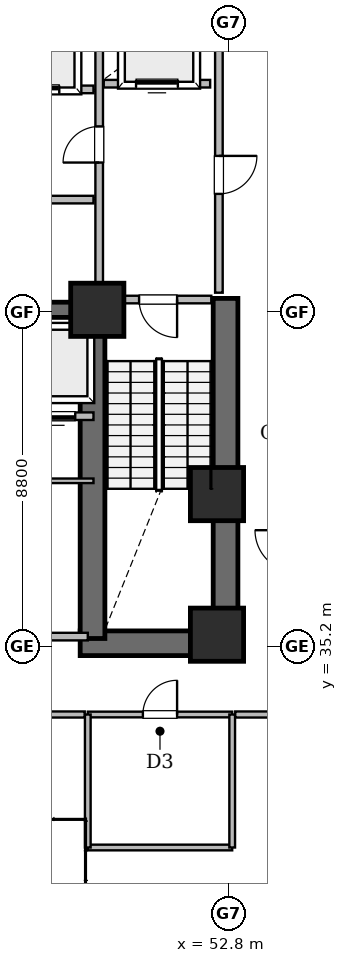
"""IFC4 building model, lengths in metres.
Left out: names, types, materials, properties, quantities, classifications, styles, units other than length and angle.
Written with IfcOpenShell. Run it as: python <this file> out.ifc"""

import sys

from ifc_helpers import new_model, si_unit, direction, frame, frame_2d, origin, origin_2d, place, context, subcontext, project, spatial, rectangle, extrude, element, fill, save


model = new_model("IFC4")
c1 = context("Model", 3, precision=1e-05, world=origin(), true_north=direction((0.0, 1.0)))
c2 = subcontext(c1, "Body", "Model", "MODEL_VIEW")
j1 = project(units=[si_unit("LENGTHUNIT", "METRE"), si_unit("PLANEANGLEUNIT", "RADIAN")], contexts=[c1])
p1 = place(None, origin())
s1 = spatial("IfcSite", under=j1, at=p1, CompositionType="ELEMENT")
p2 = place(p1, origin())
s2 = spatial("IfcBuilding", under=s1, at=p2, CompositionType="ELEMENT")
p3 = place(p2, frame((0.0, 0.0, 4.8)))
s3 = spatial("IfcBuildingStorey", under=s2, at=p3, CompositionType="ELEMENT", Elevation=4.8)
p4 = place(p3, frame((48.9, 35.275, 0.0), z_axis=(0.0, 0.0, 1.0), x_axis=(1.0, 0.0, 0.0)))
e1 = element("IfcWall", 1, at=p4, inside=s3, PredefinedType="SHEAR", context=c2, shape_type="SweptSolid", body=[
    extrude(rectangle(XDim=4.15, YDim=0.65, at=frame_2d((2.075, 0.0))), origin(), (0.0, 0.0, 1.0), 4.5),
])
p5 = place(p3, frame((52.725, 34.95, 0.0), z_axis=(0.0, 0.0, 1.0), x_axis=(0.0, 1.0, 0.0)))
e2 = element("IfcWall", 2, at=p5, inside=s3, PredefinedType="SHEAR", context=c2, shape_type="SweptSolid", body=[
    extrude(rectangle(XDim=9.4, YDim=0.65, at=frame_2d((4.7, 0.0))), origin(), (0.0, 0.0, 1.0), 4.5),
])
p6 = place(p3, frame((49.225, 35.4, 0.0), z_axis=(0.0, 0.0, 1.0), x_axis=(0.0, 1.0, 0.0)))
e3 = element("IfcWall", 3, at=p6, inside=s3, PredefinedType="SHEAR", context=c2, shape_type="SweptSolid", body=[
    extrude(rectangle(XDim=8.95, YDim=0.65, at=frame_2d((4.475, 0.0))), origin(), (0.0, 0.0, 1.0), 4.5),
])
p7 = place(p3, frame((45.05, 44.05, 0.0), z_axis=(0.0, 0.0, 1.0), x_axis=(1.0, 0.0, 0.0)))
e4 = element("IfcWall", 4, at=p7, inside=s3, PredefinedType="SHEAR", context=c2, shape_type="SweptSolid", body=[
    extrude(rectangle(XDim=4.2, YDim=0.4, at=frame_2d((2.1, 0.0))), origin(), (0.0, 0.0, 1.0), 4.5),
])
for number, where, z_axis, x_axis in (
    (5, (52.5, 35.5, 0.0), (0.0, 0.0, 1.0), (1.0, 0.0, 0.0)),
    (6, (52.5, 39.2, 0.0), (0.0, 0.0, 1.0), (1.0, 0.0, 0.0)),
    (7, (49.35, 44.05, 0.0), (0.0, 0.0, 1.0), (1.0, 0.0, 0.0)),
):
    element("IfcColumn", number, at=place(p3, frame(where, z_axis=z_axis, x_axis=x_axis)), inside=s3, PredefinedType="COLUMN", context=c2, shape_type="SweptSolid", body=[
        extrude(rectangle(XDim=1.4, YDim=1.4, at=origin_2d()), origin(), (0.0, 0.0, 1.0), 4.8),
    ])
p8 = place(p3, frame((38.9, 35.45, 0.0), z_axis=(0.0, 0.0, 1.0), x_axis=(1.0, 0.0, 0.0)))
e8 = element("IfcWall", 8, at=p8, inside=s3, PredefinedType="SOLIDWALL", context=c2, shape_type="SweptSolid", body=[
    extrude(rectangle(XDim=10.2, YDim=0.2, at=frame_2d((5.1, 0.0))), origin(), (0.0, 0.0, 1.0), 4.5),
])
p9 = place(p8, frame((4.6, 0.0, 0.0)))
e9 = element("IfcOpeningElement", 9, at=p9, cuts=e8, PredefinedType="OPENING", context=c2, shape_type="SweptSolid", body=[
    extrude(rectangle(XDim=1.0, YDim=2.15, at=frame_2d((0.5, 1.075))), frame((0.0, 0.11, 0.0), z_axis=(0.0, -1.0, 0.0), x_axis=(1.0, 0.0, 0.0)), (0.0, 0.0, 1.0), 0.22),
])
p10 = place(p3, frame((52.55, 44.5, 0.0), z_axis=(0.0, 0.0, 1.0), x_axis=(0.0, 1.0, 0.0)))
e10 = element("IfcWall", 10, at=p10, inside=s3, PredefinedType="SOLIDWALL", context=c2, shape_type="SweptSolid", body=[
    extrude(rectangle(XDim=7.92, YDim=0.2, at=frame_2d((3.96, 0.0))), origin(), (0.0, 0.0, 1.0), 4.5),
])
p11 = place(p10, frame((2.6, 0.0, 0.0)))
e11 = element("IfcOpeningElement", 11, at=p11, cuts=e10, PredefinedType="OPENING", context=c2, shape_type="SweptSolid", body=[
    extrude(rectangle(XDim=1.0, YDim=2.15, at=frame_2d((0.5, 1.075))), frame((0.0, 0.11, 0.0), z_axis=(0.0, -1.0, 0.0), x_axis=(1.0, 0.0, 0.0)), (0.0, 0.0, 1.0), 0.22),
])
p12 = place(p3, frame((49.4, 44.5, 0.0), z_axis=(0.0, 0.0, 1.0), x_axis=(0.0, 1.0, 0.0)))
e12 = element("IfcWall", 12, at=p12, inside=s3, PredefinedType="SOLIDWALL", context=c2, shape_type="SweptSolid", body=[
    extrude(rectangle(XDim=7.92, YDim=0.2, at=frame_2d((3.96, 0.0))), origin(), (0.0, 0.0, 1.0), 3.588),
])
p13 = place(p12, frame((3.425, 0.0, 0.0)))
e13 = element("IfcOpeningElement", 13, at=p13, cuts=e12, PredefinedType="OPENING", context=c2, shape_type="SweptSolid", body=[
    extrude(rectangle(XDim=0.95, YDim=2.15, at=frame_2d((0.475, 1.075))), frame((0.0, 0.11, 0.0), z_axis=(0.0, -1.0, 0.0), x_axis=(1.0, 0.0, 0.0)), (0.0, 0.0, 1.0), 0.22),
])
p14 = place(p3, frame((43.75, 49.85, 0.0), z_axis=(0.0, 0.0, 1.0), x_axis=(1.0, 0.0, 0.0)))
e14 = element("IfcWall", 14, at=p14, inside=s3, PredefinedType="SOLIDWALL", context=c2, shape_type="SweptSolid", body=[
    extrude(rectangle(XDim=5.5, YDim=0.2, at=frame_2d((2.75, 0.0))), origin(), (0.0, 0.0, 1.0), 3.588),
])
p15 = place(p14, frame((3.5, 0.0, 0.0)))
e15 = element("IfcOpeningElement", 15, at=p15, cuts=e14, PredefinedType="OPENING", context=c2, shape_type="SweptSolid", body=[
    extrude(rectangle(XDim=1.1, YDim=2.15, at=frame_2d((0.55, 1.075))), frame((0.0, 0.11, 0.0), z_axis=(0.0, -1.0, 0.0), x_axis=(1.0, 0.0, 0.0)), (0.0, 0.0, 1.0), 0.22),
])
p16 = place(p3, frame((45.32, 41.25, 0.0), z_axis=(0.0, 0.0, 1.0), x_axis=(1.0, 0.0, 0.0)))
e16 = element("IfcWall", 16, at=p16, inside=s3, PredefinedType="SOLIDWALL", context=c2, shape_type="SweptSolid", body=[
    extrude(rectangle(XDim=3.93, YDim=0.2, at=frame_2d((1.965, 0.0))), origin(), (0.0, 0.0, 1.0), 4.5),
])
p17 = place(p16, frame((0.45, 0.0, 0.0)))
e17 = element("IfcOpeningElement", 17, at=p17, cuts=e16, PredefinedType="OPENING", context=c2, shape_type="SweptSolid", body=[
    extrude(rectangle(XDim=1.0, YDim=2.15, at=frame_2d((0.5, 1.075))), frame((0.0, 0.11, 0.0), z_axis=(0.0, -1.0, 0.0), x_axis=(1.0, 0.0, 0.0)), (0.0, 0.0, 1.0), 0.22),
])
p18 = place(p16, frame((2.45, 0.0, 0.0)))
e18 = element("IfcOpeningElement", 18, at=p18, cuts=e16, PredefinedType="OPENING", context=c2, shape_type="SweptSolid", body=[
    extrude(rectangle(XDim=1.0, YDim=2.15, at=frame_2d((0.5, 1.075))), frame((0.0, 0.11, 0.0), z_axis=(0.0, -1.0, 0.0), x_axis=(1.0, 0.0, 0.0)), (0.0, 0.0, 1.0), 0.22),
])
p19 = place(p3, frame((45.32, 39.55, 0.0), z_axis=(0.0, 0.0, 1.0), x_axis=(1.0, 0.0, 0.0)))
e19 = element("IfcWall", 19, at=p19, inside=s3, PredefinedType="PARTITIONING", context=c2, shape_type="SweptSolid", body=[
    extrude(rectangle(XDim=3.93, YDim=0.12, at=frame_2d((1.965, 0.0))), origin(), (0.0, 0.0, 1.0), 4.5),
])
p20 = place(p19, frame((1.49, 0.0, 0.0)))
e20 = element("IfcOpeningElement", 20, at=p20, cuts=e19, PredefinedType="OPENING", context=c2, shape_type="SweptSolid", body=[
    extrude(rectangle(XDim=0.92, YDim=2.1, at=frame_2d((0.46, 1.05))), frame((0.0, 0.07, 0.0), z_axis=(0.0, -1.0, 0.0), x_axis=(1.0, 0.0, 0.0)), (0.0, 0.0, 1.0), 0.14),
])
p21 = place(p3, frame((49.1, 33.4, 0.0), z_axis=(0.0, 0.0, 1.0), x_axis=(1.0, 0.0, 0.0)))
e21 = element("IfcWall", 21, at=p21, inside=s3, PredefinedType="PLUMBINGWALL", context=c2, shape_type="SweptSolid", body=[
    extrude(rectangle(XDim=3.8, YDim=0.15, at=frame_2d((1.9, 0.0))), origin(), (0.0, 0.0, 1.0), 4.0),
])
p22 = place(p21, frame((1.45, 0.0, 0.0)))
e22 = element("IfcOpeningElement", 22, at=p22, cuts=e21, PredefinedType="OPENING", context=c2, shape_type="SweptSolid", body=[
    extrude(rectangle(XDim=0.9, YDim=2.1, at=frame_2d((0.45, 1.05))), frame((0.0, 0.085, 0.0), z_axis=(0.0, -1.0, 0.0), x_axis=(1.0, 0.0, 0.0)), (0.0, 0.0, 1.0), 0.17),
])
p23 = place(p3, frame((49.55, 44.32, 0.0), z_axis=(0.0, 0.0, 1.0), x_axis=(1.0, 0.0, 0.0)))
e23 = element("IfcWall", 23, at=p23, inside=s3, PredefinedType="SOLIDWALL", context=c2, shape_type="SweptSolid", body=[
    extrude(rectangle(XDim=2.8, YDim=0.2, at=frame_2d((1.4, 0.0))), origin(), (0.0, 0.0, 1.0), 3.588),
])
p24 = place(p23, frame((0.9, 0.0, 0.0)))
e24 = element("IfcOpeningElement", 24, at=p24, cuts=e23, PredefinedType="OPENING", context=c2, shape_type="SweptSolid", body=[
    extrude(rectangle(XDim=1.0, YDim=2.15, at=frame_2d((0.5, 1.075))), frame((0.0, 0.11, 0.0), z_axis=(0.0, -1.0, 0.0), x_axis=(1.0, 0.0, 0.0)), (0.0, 0.0, 1.0), 0.22),
])
p25 = place(p3, frame((49.52, 50.0, 0.0), z_axis=(0.0, 0.0, 1.0), x_axis=(1.0, 0.0, 0.0)))
e25 = element("IfcWall", 25, at=p25, inside=s3, PredefinedType="SOLIDWALL", context=c2, shape_type="SweptSolid", body=[
    extrude(rectangle(XDim=2.8, YDim=0.2, at=frame_2d((1.4, 0.0))), origin(), (0.0, 0.0, 1.0), 4.5),
])
p26 = place(p25, frame((0.85, 0.0, 0.0)))
e26 = element("IfcOpeningElement", 26, at=p26, cuts=e25, PredefinedType="OPENING", context=c2, shape_type="SweptSolid", body=[
    extrude(rectangle(XDim=1.1, YDim=2.15, at=frame_2d((0.55, 1.075))), frame((0.0, 0.11, 0.0), z_axis=(0.0, -1.0, 0.0), x_axis=(1.0, 0.0, 0.0)), (0.0, 0.0, 1.0), 0.22),
])
p27 = place(p3, frame((38.98, 33.4, 0.0), z_axis=(0.0, 0.0, 1.0), x_axis=(1.0, 0.0, 0.0)))
e27 = element("IfcWall", 27, at=p27, inside=s3, PredefinedType="SOLIDWALL", context=c2, shape_type="SweptSolid", body=[
    extrude(rectangle(XDim=10.04, YDim=0.16, at=frame_2d((5.02, 0.0))), origin(), (0.0, 0.0, 1.0), 4.5),
])
p28 = place(p3, frame((45.32, 46.95, 0.0), z_axis=(0.0, 0.0, 1.0), x_axis=(1.0, 0.0, 0.0)))
e28 = element("IfcWall", 28, at=p28, inside=s3, PredefinedType="SOLIDWALL", context=c2, shape_type="SweptSolid", body=[
    extrude(rectangle(XDim=3.93, YDim=0.2, at=frame_2d((1.965, 0.0))), origin(), (0.0, 0.0, 1.0), 3.588),
])
p29 = place(p3, frame((49.1, 29.9, 0.0), z_axis=(0.0, 0.0, 1.0), x_axis=(1.0, 0.0, 0.0)))
e29 = element("IfcWall", 29, at=p29, inside=s3, PredefinedType="PLUMBINGWALL", context=c2, shape_type="SweptSolid", body=[
    extrude(rectangle(XDim=3.8, YDim=0.15, at=frame_2d((1.9, 0.0))), origin(), (0.0, 0.0, 1.0), 4.5),
])
p30 = place(p3, frame((49.1, 33.4, 0.0), z_axis=(0.0, 0.0, 1.0), x_axis=(0.0, -1.0, 0.0)))
e30 = element("IfcWall", 30, at=p30, inside=s3, PredefinedType="PLUMBINGWALL", context=c2, shape_type="SweptSolid", body=[
    extrude(rectangle(XDim=3.5, YDim=0.15, at=frame_2d((1.75, 0.0))), origin(), (0.0, 0.0, 1.0), 4.0),
])
p31 = place(p3, frame((52.9, 29.9, 0.0), z_axis=(0.0, 0.0, 1.0), x_axis=(0.0, 1.0, 0.0)))
e31 = element("IfcWall", 31, at=p31, inside=s3, PredefinedType="PLUMBINGWALL", context=c2, shape_type="SweptSolid", body=[
    extrude(rectangle(XDim=3.5, YDim=0.15, at=frame_2d((1.75, 0.0))), origin(), (0.0, 0.0, 1.0), 4.5),
])
p32 = place(p3, frame((52.98, 33.4, 0.0), z_axis=(0.0, 0.0, 1.0), x_axis=(1.0, 0.0, 0.0)))
e32 = element("IfcWall", 32, at=p32, inside=s3, PredefinedType="SOLIDWALL", context=c2, shape_type="SweptSolid", body=[
    extrude(rectangle(XDim=1.54, YDim=0.16, at=frame_2d((0.77, 0.0))), origin(), (0.0, 0.0, 1.0), 4.5),
])
p33 = place(p24, frame((1.0, 0.0, 0.0), z_axis=(0.0, 0.0, 1.0), x_axis=(-1.0, 0.0, 0.0)))
e33 = element("IfcDoor", 33, at=p33, inside=s3, OperationType="SINGLE_SWING_RIGHT", PredefinedType="DOOR", context=c2, shape_type="SweptSolid", body=[
    extrude(rectangle(XDim=1.0, YDim=2.15, at=frame_2d((0.5, 1.075))), frame((0.0, 0.025, 0.0), z_axis=(0.0, -1.0, 0.0), x_axis=(1.0, 0.0, 0.0)), (0.0, 0.0, 1.0), 0.05),
])
fill(e24, e33)
p34 = place(p11, frame((1.0, 0.0, 0.0), z_axis=(0.0, 0.0, 1.0), x_axis=(-1.0, 0.0, 0.0)))
e34 = element("IfcDoor", 34, at=p34, inside=s3, OperationType="SINGLE_SWING_RIGHT", PredefinedType="DOOR", context=c2, shape_type="SweptSolid", body=[
    extrude(rectangle(XDim=1.0, YDim=2.15, at=frame_2d((0.5, 1.075))), frame((0.0, 0.025, 0.0), z_axis=(0.0, -1.0, 0.0), x_axis=(1.0, 0.0, 0.0)), (0.0, 0.0, 1.0), 0.05),
])
fill(e11, e34)
p35 = place(p13, origin())
e35 = element("IfcDoor", 35, at=p35, inside=s3, OperationType="SINGLE_SWING_LEFT", PredefinedType="DOOR", context=c2, shape_type="SweptSolid", body=[
    extrude(rectangle(XDim=0.95, YDim=2.15, at=frame_2d((0.475, 1.075))), frame((0.0, 0.025, 0.0), z_axis=(0.0, -1.0, 0.0), x_axis=(1.0, 0.0, 0.0)), (0.0, 0.0, 1.0), 0.05),
])
fill(e13, e35)
p36 = place(p26, origin())
e36 = element("IfcDoor", 36, at=p36, inside=s3, OperationType="SLIDING_TO_LEFT", PredefinedType="DOOR", context=c2, shape_type="SweptSolid", body=[
    extrude(rectangle(XDim=1.1, YDim=2.15, at=frame_2d((0.55, 1.075))), frame((0.0, 0.025, 0.0), z_axis=(0.0, -1.0, 0.0), x_axis=(1.0, 0.0, 0.0)), (0.0, 0.0, 1.0), 0.05),
])
fill(e26, e36)
p37 = place(p15, origin())
e37 = element("IfcDoor", 37, at=p37, inside=s3, OperationType="SLIDING_TO_LEFT", PredefinedType="DOOR", context=c2, shape_type="SweptSolid", body=[
    extrude(rectangle(XDim=1.1, YDim=2.15, at=frame_2d((0.55, 1.075))), frame((0.0, 0.025, 0.0), z_axis=(0.0, -1.0, 0.0), x_axis=(1.0, 0.0, 0.0)), (0.0, 0.0, 1.0), 0.05),
])
fill(e15, e37)
p38 = place(p18, frame((1.0, 0.0, 0.0), z_axis=(0.0, 0.0, 1.0), x_axis=(-1.0, 0.0, 0.0)))
e38 = element("IfcDoor", 38, at=p38, inside=s3, OperationType="SLIDING_TO_LEFT", PredefinedType="DOOR", context=c2, shape_type="SweptSolid", body=[
    extrude(rectangle(XDim=1.0, YDim=2.15, at=frame_2d((0.5, 1.075))), frame((0.0, 0.025, 0.0), z_axis=(0.0, -1.0, 0.0), x_axis=(1.0, 0.0, 0.0)), (0.0, 0.0, 1.0), 0.05),
])
fill(e18, e38)
p39 = place(p22, origin())
e39 = element("IfcDoor", 39, at=p39, inside=s3, OperationType="SINGLE_SWING_RIGHT", PredefinedType="DOOR", context=c2, shape_type="SweptSolid", body=[
    extrude(rectangle(XDim=0.9, YDim=2.1, at=frame_2d((0.45, 1.05))), frame((0.0, 0.025, 0.0), z_axis=(0.0, -1.0, 0.0), x_axis=(1.0, 0.0, 0.0)), (0.0, 0.0, 1.0), 0.05),
])
fill(e22, e39)
save(model, sys.argv[1])
